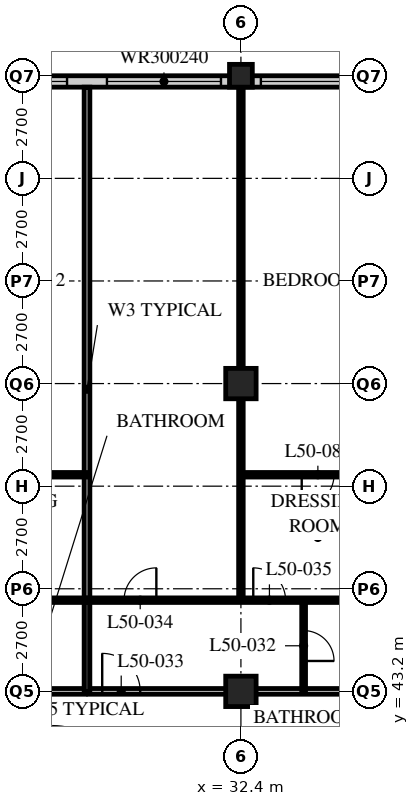
"""IFC4 building model, lengths in metres.
Left out: names, types, materials, properties, quantities, classifications, styles, units other than length and angle.
Written with IfcOpenShell. Run it as: python <this file> out.ifc"""

import sys

from ifc_helpers import new_model, si_unit, direction, frame, frame_2d, origin, origin_2d, place, context, subcontext, project, spatial, rectangle, hollow_rectangle, extrude, element, fill, save


model = new_model("IFC4")
c1 = context("Model", 3, precision=1e-05, world=origin(), true_north=direction((0.0, 1.0)))
c2 = subcontext(c1, "Body", "Model", "MODEL_VIEW")
j1 = project(units=[si_unit("LENGTHUNIT", "METRE"), si_unit("PLANEANGLEUNIT", "RADIAN")], contexts=[c1])
p1 = place(None, origin())
s1 = spatial("IfcSite", under=j1, at=p1, CompositionType="ELEMENT")
p2 = place(p1, origin())
s2 = spatial("IfcBuilding", under=s1, at=p2, CompositionType="ELEMENT")
p3 = place(p2, frame((0.0, 0.0, 195.6)))
s3 = spatial("IfcBuildingStorey", under=s2, at=p3, CompositionType="ELEMENT", Elevation=195.6)
for number, where, z_axis, x_axis in (
    (1, (32.4, 43.2, 0.0), (0.0, 0.0, 1.0), (1.0, 0.0, 0.0)),
    (2, (32.4, 51.3, 0.0), (0.0, 0.0, 1.0), (1.0, 0.0, 0.0)),
):
    element("IfcColumn", number, at=place(p3, frame(where, z_axis=z_axis, x_axis=x_axis)), inside=s3, PredefinedType="COLUMN", context=c2, shape_type="SweptSolid", body=[
        extrude(hollow_rectangle(XDim=0.8, YDim=0.8, WallThickness=0.08, at=origin_2d()), origin(), (0.0, 0.0, 1.0), 3.6),
    ])
p4 = place(p3, frame((32.4, 59.4, 0.0), z_axis=(0.0, 0.0, 1.0), x_axis=(1.0, 0.0, 0.0)))
e3 = element("IfcColumn", 3, at=p4, inside=s3, PredefinedType="COLUMN", context=c2, shape_type="SweptSolid", body=[
    extrude(hollow_rectangle(XDim=0.6, YDim=0.6, WallThickness=0.05, at=origin_2d()), origin(), (0.0, 0.0, 1.0), 3.6),
])
p5 = place(p3, frame((48.3, 59.25, 0.0), z_axis=(0.0, 0.0, 1.0), x_axis=(-1.0, 0.0, 0.0)))
e4 = element("IfcWall", 4, at=p5, inside=s3, PredefinedType="SOLIDWALL", context=c2, shape_type="SweptSolid", body=[
    extrude(rectangle(XDim=40.2, YDim=0.3, at=frame_2d((20.1, 0.0))), origin(), (0.0, 0.0, 1.0), 3.39),
])
p6 = place(p5, frame((0.225, 0.0, 0.6)))
e5 = element("IfcOpeningElement", 5, at=p6, cuts=e4, PredefinedType="OPENING", context=c2, shape_type="SweptSolid", body=[
    extrude(rectangle(XDim=3.0, YDim=2.4, at=frame_2d((1.5, 1.2))), frame((0.0, 0.16, 0.0), z_axis=(0.0, -1.0, 0.0), x_axis=(1.0, 0.0, 0.0)), (0.0, 0.0, 1.0), 0.32),
])
p7 = place(p5, frame((4.275, 0.0, 0.6)))
e6 = element("IfcOpeningElement", 6, at=p7, cuts=e4, PredefinedType="OPENING", context=c2, shape_type="SweptSolid", body=[
    extrude(rectangle(XDim=3.0, YDim=2.4, at=frame_2d((1.5, 1.2))), frame((0.0, 0.16, 0.0), z_axis=(0.0, -1.0, 0.0), x_axis=(1.0, 0.0, 0.0)), (0.0, 0.0, 1.0), 0.32),
])
p8 = place(p5, frame((8.325, 0.0, 0.6)))
e7 = element("IfcOpeningElement", 7, at=p8, cuts=e4, PredefinedType="OPENING", context=c2, shape_type="SweptSolid", body=[
    extrude(rectangle(XDim=3.0, YDim=2.4, at=frame_2d((1.5, 1.2))), frame((0.0, 0.16, 0.0), z_axis=(0.0, -1.0, 0.0), x_axis=(1.0, 0.0, 0.0)), (0.0, 0.0, 1.0), 0.32),
])
p9 = place(p5, frame((12.375, 0.0, 0.6)))
e8 = element("IfcOpeningElement", 8, at=p9, cuts=e4, PredefinedType="OPENING", context=c2, shape_type="SweptSolid", body=[
    extrude(rectangle(XDim=3.0, YDim=2.4, at=frame_2d((1.5, 1.2))), frame((0.0, 0.16, 0.0), z_axis=(0.0, -1.0, 0.0), x_axis=(1.0, 0.0, 0.0)), (0.0, 0.0, 1.0), 0.32),
])
p10 = place(p5, frame((16.425, 0.0, 0.6)))
e9 = element("IfcOpeningElement", 9, at=p10, cuts=e4, PredefinedType="OPENING", context=c2, shape_type="SweptSolid", body=[
    extrude(rectangle(XDim=3.0, YDim=2.4, at=frame_2d((1.5, 1.2))), frame((0.0, 0.16, 0.0), z_axis=(0.0, -1.0, 0.0), x_axis=(1.0, 0.0, 0.0)), (0.0, 0.0, 1.0), 0.32),
])
p11 = place(p5, frame((20.475, 0.0, 0.6)))
e10 = element("IfcOpeningElement", 10, at=p11, cuts=e4, PredefinedType="OPENING", context=c2, shape_type="SweptSolid", body=[
    extrude(rectangle(XDim=3.0, YDim=2.4, at=frame_2d((1.5, 1.2))), frame((0.0, 0.16, 0.0), z_axis=(0.0, -1.0, 0.0), x_axis=(1.0, 0.0, 0.0)), (0.0, 0.0, 1.0), 0.32),
])
p12 = place(p5, frame((24.525, 0.0, 0.6)))
e11 = element("IfcOpeningElement", 11, at=p12, cuts=e4, PredefinedType="OPENING", context=c2, shape_type="SweptSolid", body=[
    extrude(rectangle(XDim=3.0, YDim=2.4, at=frame_2d((1.5, 1.2))), frame((0.0, 0.16, 0.0), z_axis=(0.0, -1.0, 0.0), x_axis=(1.0, 0.0, 0.0)), (0.0, 0.0, 1.0), 0.32),
])
p13 = place(p5, frame((28.575, 0.0, 0.6)))
e12 = element("IfcOpeningElement", 12, at=p13, cuts=e4, PredefinedType="OPENING", context=c2, shape_type="SweptSolid", body=[
    extrude(rectangle(XDim=3.0, YDim=2.4, at=frame_2d((1.5, 1.2))), frame((0.0, 0.16, 0.0), z_axis=(0.0, -1.0, 0.0), x_axis=(1.0, 0.0, 0.0)), (0.0, 0.0, 1.0), 0.32),
])
p14 = place(p5, frame((32.625, 0.0, 0.6)))
e13 = element("IfcOpeningElement", 13, at=p14, cuts=e4, PredefinedType="OPENING", context=c2, shape_type="SweptSolid", body=[
    extrude(rectangle(XDim=3.0, YDim=2.4, at=frame_2d((1.5, 1.2))), frame((0.0, 0.16, 0.0), z_axis=(0.0, -1.0, 0.0), x_axis=(1.0, 0.0, 0.0)), (0.0, 0.0, 1.0), 0.32),
])
p15 = place(p5, frame((36.675, 0.0, 0.6)))
e14 = element("IfcOpeningElement", 14, at=p15, cuts=e4, PredefinedType="OPENING", context=c2, shape_type="SweptSolid", body=[
    extrude(rectangle(XDim=3.0, YDim=2.4, at=frame_2d((1.5, 1.2))), frame((0.0, 0.16, 0.0), z_axis=(0.0, -1.0, 0.0), x_axis=(1.0, 0.0, 0.0)), (0.0, 0.0, 1.0), 0.32),
])
p16 = place(p3, frame((8.1, 43.2, 0.0), z_axis=(0.0, 0.0, 1.0), x_axis=(1.0, 0.0, 0.0)))
e15 = element("IfcWall", 15, at=p16, inside=s3, PredefinedType="PARTITIONING", context=c2, shape_type="SweptSolid", body=[
    extrude(rectangle(XDim=40.5, YDim=0.15, at=frame_2d((20.25, 0.0))), origin(), (0.0, 0.0, 1.0), 2.778),
])
p17 = place(p16, frame((4.45, 0.0, 0.0)))
e16 = element("IfcOpeningElement", 16, at=p17, cuts=e15, PredefinedType="OPENING", context=c2, shape_type="SweptSolid", body=[
    extrude(rectangle(XDim=1.0, YDim=2.1, at=frame_2d((0.5, 1.05))), frame((0.0, 0.085, 0.0), z_axis=(0.0, -1.0, 0.0), x_axis=(1.0, 0.0, 0.0)), (0.0, 0.0, 1.0), 0.17),
])
p18 = place(p16, frame((20.65, 0.0, 0.0)))
e17 = element("IfcOpeningElement", 17, at=p18, cuts=e15, PredefinedType="OPENING", context=c2, shape_type="SweptSolid", body=[
    extrude(rectangle(XDim=1.0, YDim=2.1, at=frame_2d((0.5, 1.05))), frame((0.0, 0.085, 0.0), z_axis=(0.0, -1.0, 0.0), x_axis=(1.0, 0.0, 0.0)), (0.0, 0.0, 1.0), 0.17),
])
p19 = place(p16, frame((28.75, 0.0, 0.0)))
e18 = element("IfcOpeningElement", 18, at=p19, cuts=e15, PredefinedType="OPENING", context=c2, shape_type="SweptSolid", body=[
    extrude(rectangle(XDim=1.0, YDim=2.1, at=frame_2d((0.5, 1.05))), frame((0.0, 0.085, 0.0), z_axis=(0.0, -1.0, 0.0), x_axis=(1.0, 0.0, 0.0)), (0.0, 0.0, 1.0), 0.17),
])
p20 = place(p16, frame((37.975, 0.0, 0.0)))
e19 = element("IfcOpeningElement", 19, at=p20, cuts=e15, PredefinedType="OPENING", context=c2, shape_type="SweptSolid", body=[
    extrude(rectangle(XDim=1.0, YDim=2.1, at=frame_2d((0.5, 1.05))), frame((0.0, 0.085, 0.0), z_axis=(0.0, -1.0, 0.0), x_axis=(1.0, 0.0, 0.0)), (0.0, 0.0, 1.0), 0.17),
])
p21 = place(p16, frame((1.525, 0.0, 0.0)))
e20 = element("IfcOpeningElement", 20, at=p21, cuts=e15, PredefinedType="OPENING", context=c2, shape_type="SweptSolid", body=[
    extrude(rectangle(XDim=1.0, YDim=2.1, at=frame_2d((0.5, 1.05))), frame((0.0, 0.085, 0.0), z_axis=(0.0, -1.0, 0.0), x_axis=(1.0, 0.0, 0.0)), (0.0, 0.0, 1.0), 0.17),
])
p22 = place(p3, frame((28.35, 43.2, 0.0), z_axis=(0.0, 0.0, 1.0), x_axis=(0.0, 1.0, 0.0)))
e21 = element("IfcWall", 21, at=p22, inside=s3, PredefinedType="PARTITIONING", context=c2, shape_type="SweptSolid", body=[
    extrude(rectangle(XDim=15.9, YDim=0.15, at=frame_2d((7.95, 0.0))), origin(), (0.0, 0.0, 1.0), 3.39),
])
p23 = place(p3, frame((34.05, 43.2, 0.0), z_axis=(0.0, 0.0, 1.0), x_axis=(0.0, 1.0, 0.0)))
e22 = element("IfcWall", 22, at=p23, inside=s3, PredefinedType="PARTITIONING", context=c2, shape_type="SweptSolid", body=[
    extrude(rectangle(XDim=2.4, YDim=0.1, at=frame_2d((1.2, 0.0))), origin(), (0.0, 0.0, 1.0), 3.39),
])
p24 = place(p23, frame((0.8, 0.0, 0.0)))
e23 = element("IfcOpeningElement", 23, at=p24, cuts=e22, PredefinedType="OPENING", context=c2, shape_type="SweptSolid", body=[
    extrude(rectangle(XDim=0.8, YDim=2.1, at=frame_2d((0.4, 1.05))), frame((0.0, 0.06, 0.0), z_axis=(0.0, -1.0, 0.0), x_axis=(1.0, 0.0, 0.0)), (0.0, 0.0, 1.0), 0.12),
])
p25 = place(p3, frame((32.4, 45.6, 0.0), z_axis=(0.0, 0.0, 1.0), x_axis=(0.0, 1.0, 0.0)))
e24 = element("IfcWall", 24, at=p25, inside=s3, PredefinedType="PARTITIONING", context=c2, shape_type="SweptSolid", body=[
    extrude(rectangle(XDim=13.5, YDim=0.12, at=frame_2d((6.75, 0.0))), origin(), (0.0, 0.0, 1.0), 2.778),
])
p26 = place(p3, frame((4.1, 45.6, 0.0), z_axis=(0.0, 0.0, 1.0), x_axis=(1.0, 0.0, 0.0)))
e25 = element("IfcWall", 25, at=p26, inside=s3, PredefinedType="PARTITIONING", context=c2, shape_type="SweptSolid", body=[
    extrude(rectangle(XDim=48.5, YDim=0.12, at=frame_2d((24.25, 0.0))), origin(), (0.0, 0.0, 1.0), 3.39),
])
p27 = place(p26, frame((9.025, 0.0, 0.0)))
e26 = element("IfcOpeningElement", 26, at=p27, cuts=e25, PredefinedType="OPENING", context=c2, shape_type="SweptSolid", body=[
    extrude(rectangle(XDim=0.85, YDim=2.1, at=frame_2d((0.425, 1.05))), frame((0.0, 0.07, 0.0), z_axis=(0.0, -1.0, 0.0), x_axis=(1.0, 0.0, 0.0)), (0.0, 0.0, 1.0), 0.14),
])
p28 = place(p26, frame((16.475, 0.0, 0.0)))
e27 = element("IfcOpeningElement", 27, at=p28, cuts=e25, PredefinedType="OPENING", context=c2, shape_type="SweptSolid", body=[
    extrude(rectangle(XDim=0.85, YDim=2.1, at=frame_2d((0.425, 1.05))), frame((0.0, 0.07, 0.0), z_axis=(0.0, -1.0, 0.0), x_axis=(1.0, 0.0, 0.0)), (0.0, 0.0, 1.0), 0.14),
])
p29 = place(p26, frame((20.525, 0.0, 0.0)))
e28 = element("IfcOpeningElement", 28, at=p29, cuts=e25, PredefinedType="OPENING", context=c2, shape_type="SweptSolid", body=[
    extrude(rectangle(XDim=0.85, YDim=2.1, at=frame_2d((0.425, 1.05))), frame((0.0, 0.07, 0.0), z_axis=(0.0, -1.0, 0.0), x_axis=(1.0, 0.0, 0.0)), (0.0, 0.0, 1.0), 0.14),
])
p30 = place(p26, frame((25.225, 0.0, 0.0)))
e29 = element("IfcOpeningElement", 29, at=p30, cuts=e25, PredefinedType="OPENING", context=c2, shape_type="SweptSolid", body=[
    extrude(rectangle(XDim=0.85, YDim=2.1, at=frame_2d((0.425, 1.05))), frame((0.0, 0.07, 0.0), z_axis=(0.0, -1.0, 0.0), x_axis=(1.0, 0.0, 0.0)), (0.0, 0.0, 1.0), 0.14),
])
p31 = place(p26, frame((28.625, 0.0, 0.0)))
e30 = element("IfcOpeningElement", 30, at=p31, cuts=e25, PredefinedType="OPENING", context=c2, shape_type="SweptSolid", body=[
    extrude(rectangle(XDim=0.85, YDim=2.1, at=frame_2d((0.425, 1.05))), frame((0.0, 0.07, 0.0), z_axis=(0.0, -1.0, 0.0), x_axis=(1.0, 0.0, 0.0)), (0.0, 0.0, 1.0), 0.14),
])
p32 = place(p26, frame((33.325, 0.0, 0.0)))
e31 = element("IfcOpeningElement", 31, at=p32, cuts=e25, PredefinedType="OPENING", context=c2, shape_type="SweptSolid", body=[
    extrude(rectangle(XDim=0.85, YDim=2.1, at=frame_2d((0.425, 1.05))), frame((0.0, 0.07, 0.0), z_axis=(0.0, -1.0, 0.0), x_axis=(1.0, 0.0, 0.0)), (0.0, 0.0, 1.0), 0.14),
])
p33 = place(p26, frame((36.725, 0.0, 0.0)))
e32 = element("IfcOpeningElement", 32, at=p33, cuts=e25, PredefinedType="OPENING", context=c2, shape_type="SweptSolid", body=[
    extrude(rectangle(XDim=0.85, YDim=2.1, at=frame_2d((0.425, 1.05))), frame((0.0, 0.07, 0.0), z_axis=(0.0, -1.0, 0.0), x_axis=(1.0, 0.0, 0.0)), (0.0, 0.0, 1.0), 0.14),
])
p34 = place(p26, frame((40.925, 0.0, 0.0)))
e33 = element("IfcOpeningElement", 33, at=p34, cuts=e25, PredefinedType="OPENING", context=c2, shape_type="SweptSolid", body=[
    extrude(rectangle(XDim=0.85, YDim=2.1, at=frame_2d((0.425, 1.05))), frame((0.0, 0.07, 0.0), z_axis=(0.0, -1.0, 0.0), x_axis=(1.0, 0.0, 0.0)), (0.0, 0.0, 1.0), 0.14),
])
p35 = place(p26, frame((44.775, 0.0, 0.0)))
e34 = element("IfcOpeningElement", 34, at=p35, cuts=e25, PredefinedType="OPENING", context=c2, shape_type="SweptSolid", body=[
    extrude(rectangle(XDim=0.85, YDim=2.1, at=frame_2d((0.425, 1.05))), frame((0.0, 0.07, 0.0), z_axis=(0.0, -1.0, 0.0), x_axis=(1.0, 0.0, 0.0)), (0.0, 0.0, 1.0), 0.14),
])
p36 = place(p26, frame((6.725, 0.0, 0.0)))
e35 = element("IfcOpeningElement", 35, at=p36, cuts=e25, PredefinedType="OPENING", context=c2, shape_type="SweptSolid", body=[
    extrude(rectangle(XDim=0.85, YDim=2.1, at=frame_2d((0.425, 1.05))), frame((0.0, 0.07, 0.0), z_axis=(0.0, -1.0, 0.0), x_axis=(1.0, 0.0, 0.0)), (0.0, 0.0, 1.0), 0.14),
])
p37 = place(p26, frame((2.875, 0.0, 0.0)))
e36 = element("IfcOpeningElement", 36, at=p37, cuts=e25, PredefinedType="OPENING", context=c2, shape_type="SweptSolid", body=[
    extrude(rectangle(XDim=0.85, YDim=2.1, at=frame_2d((0.425, 1.05))), frame((0.0, 0.07, 0.0), z_axis=(0.0, -1.0, 0.0), x_axis=(1.0, 0.0, 0.0)), (0.0, 0.0, 1.0), 0.14),
])
p38 = place(p3, frame((24.3, 48.9, 0.0), z_axis=(0.0, 0.0, 1.0), x_axis=(1.0, 0.0, 0.0)))
e37 = element("IfcWall", 37, at=p38, inside=s3, PredefinedType="PARTITIONING", context=c2, shape_type="SweptSolid", body=[
    extrude(rectangle(XDim=4.05, YDim=0.12, at=frame_2d((2.025, 0.0))), origin(), (0.0, 0.0, 1.0), 3.39),
])
p39 = place(p38, frame((1.6, 0.0, 0.0)))
e38 = element("IfcOpeningElement", 38, at=p39, cuts=e37, PredefinedType="OPENING", context=c2, shape_type="SweptSolid", body=[
    extrude(rectangle(XDim=0.85, YDim=2.1, at=frame_2d((0.425, 1.05))), frame((0.0, 0.07, 0.0), z_axis=(0.0, -1.0, 0.0), x_axis=(1.0, 0.0, 0.0)), (0.0, 0.0, 1.0), 0.14),
])
p40 = place(p3, frame((32.4, 48.9, 0.0), z_axis=(0.0, 0.0, 1.0), x_axis=(1.0, 0.0, 0.0)))
e39 = element("IfcWall", 39, at=p40, inside=s3, PredefinedType="PARTITIONING", context=c2, shape_type="SweptSolid", body=[
    extrude(rectangle(XDim=4.05, YDim=0.12, at=frame_2d((2.025, 0.0))), origin(), (0.0, 0.0, 1.0), 3.39),
])
p41 = place(p40, frame((1.6, 0.0, 0.0)))
e40 = element("IfcOpeningElement", 40, at=p41, cuts=e39, PredefinedType="OPENING", context=c2, shape_type="SweptSolid", body=[
    extrude(rectangle(XDim=0.85, YDim=2.1, at=frame_2d((0.425, 1.05))), frame((0.0, 0.07, 0.0), z_axis=(0.0, -1.0, 0.0), x_axis=(1.0, 0.0, 0.0)), (0.0, 0.0, 1.0), 0.14),
])
p42 = place(p9, origin())
e41 = element("IfcWindow", 41, at=p42, inside=s3, PartitioningType="SINGLE_PANEL", PredefinedType="WINDOW", context=c2, shape_type="SweptSolid", body=[
    extrude(rectangle(XDim=3.0, YDim=2.4, at=frame_2d((1.5, 1.2))), frame((0.0, 0.03, 0.0), z_axis=(0.0, -1.0, 0.0), x_axis=(1.0, 0.0, 0.0)), (0.0, 0.0, 1.0), 0.06),
])
fill(e8, e41)
p43 = place(p10, origin())
e42 = element("IfcWindow", 42, at=p43, inside=s3, PartitioningType="SINGLE_PANEL", PredefinedType="WINDOW", context=c2, shape_type="SweptSolid", body=[
    extrude(rectangle(XDim=3.0, YDim=2.4, at=frame_2d((1.5, 1.2))), frame((0.0, 0.03, 0.0), z_axis=(0.0, -1.0, 0.0), x_axis=(1.0, 0.0, 0.0)), (0.0, 0.0, 1.0), 0.06),
])
fill(e9, e42)
p44 = place(p11, origin())
e43 = element("IfcWindow", 43, at=p44, inside=s3, PartitioningType="SINGLE_PANEL", PredefinedType="WINDOW", context=c2, shape_type="SweptSolid", body=[
    extrude(rectangle(XDim=3.0, YDim=2.4, at=frame_2d((1.5, 1.2))), frame((0.0, 0.03, 0.0), z_axis=(0.0, -1.0, 0.0), x_axis=(1.0, 0.0, 0.0)), (0.0, 0.0, 1.0), 0.06),
])
fill(e10, e43)
p45 = place(p24, origin())
e44 = element("IfcDoor", 44, at=p45, inside=s3, OperationType="SINGLE_SWING_RIGHT", PredefinedType="DOOR", context=c2, shape_type="SweptSolid", body=[
    extrude(rectangle(XDim=0.8, YDim=2.1, at=frame_2d((0.4, 1.05))), frame((0.0, 0.025, 0.0), z_axis=(0.0, -1.0, 0.0), x_axis=(1.0, 0.0, 0.0)), (0.0, 0.0, 1.0), 0.05),
])
fill(e23, e44)
p46 = place(p18, origin())
e45 = element("IfcDoor", 45, at=p46, inside=s3, OperationType="SINGLE_SWING_LEFT", PredefinedType="DOOR", context=c2, shape_type="SweptSolid", body=[
    extrude(rectangle(XDim=1.0, YDim=2.1, at=frame_2d((0.5, 1.05))), frame((0.0, 0.025, 0.0), z_axis=(0.0, -1.0, 0.0), x_axis=(1.0, 0.0, 0.0)), (0.0, 0.0, 1.0), 0.05),
])
fill(e17, e45)
p47 = place(p30, origin())
e46 = element("IfcDoor", 46, at=p47, inside=s3, OperationType="SINGLE_SWING_RIGHT", PredefinedType="DOOR", context=c2, shape_type="SweptSolid", body=[
    extrude(rectangle(XDim=0.85, YDim=2.1, at=frame_2d((0.425, 1.05))), frame((0.0, 0.025, 0.0), z_axis=(0.0, -1.0, 0.0), x_axis=(1.0, 0.0, 0.0)), (0.0, 0.0, 1.0), 0.05),
])
fill(e29, e46)
p48 = place(p31, origin())
e47 = element("IfcDoor", 47, at=p48, inside=s3, OperationType="SINGLE_SWING_LEFT", PredefinedType="DOOR", context=c2, shape_type="SweptSolid", body=[
    extrude(rectangle(XDim=0.85, YDim=2.1, at=frame_2d((0.425, 1.05))), frame((0.0, 0.025, 0.0), z_axis=(0.0, -1.0, 0.0), x_axis=(1.0, 0.0, 0.0)), (0.0, 0.0, 1.0), 0.05),
])
fill(e30, e47)
p49 = place(p41, origin())
e48 = element("IfcDoor", 48, at=p49, inside=s3, OperationType="SINGLE_SWING_RIGHT", PredefinedType="DOOR", context=c2, shape_type="SweptSolid", body=[
    extrude(rectangle(XDim=0.85, YDim=2.1, at=frame_2d((0.425, 1.05))), frame((0.0, 0.025, 0.0), z_axis=(0.0, -1.0, 0.0), x_axis=(1.0, 0.0, 0.0)), (0.0, 0.0, 1.0), 0.05),
])
fill(e40, e48)
save(model, sys.argv[1])
